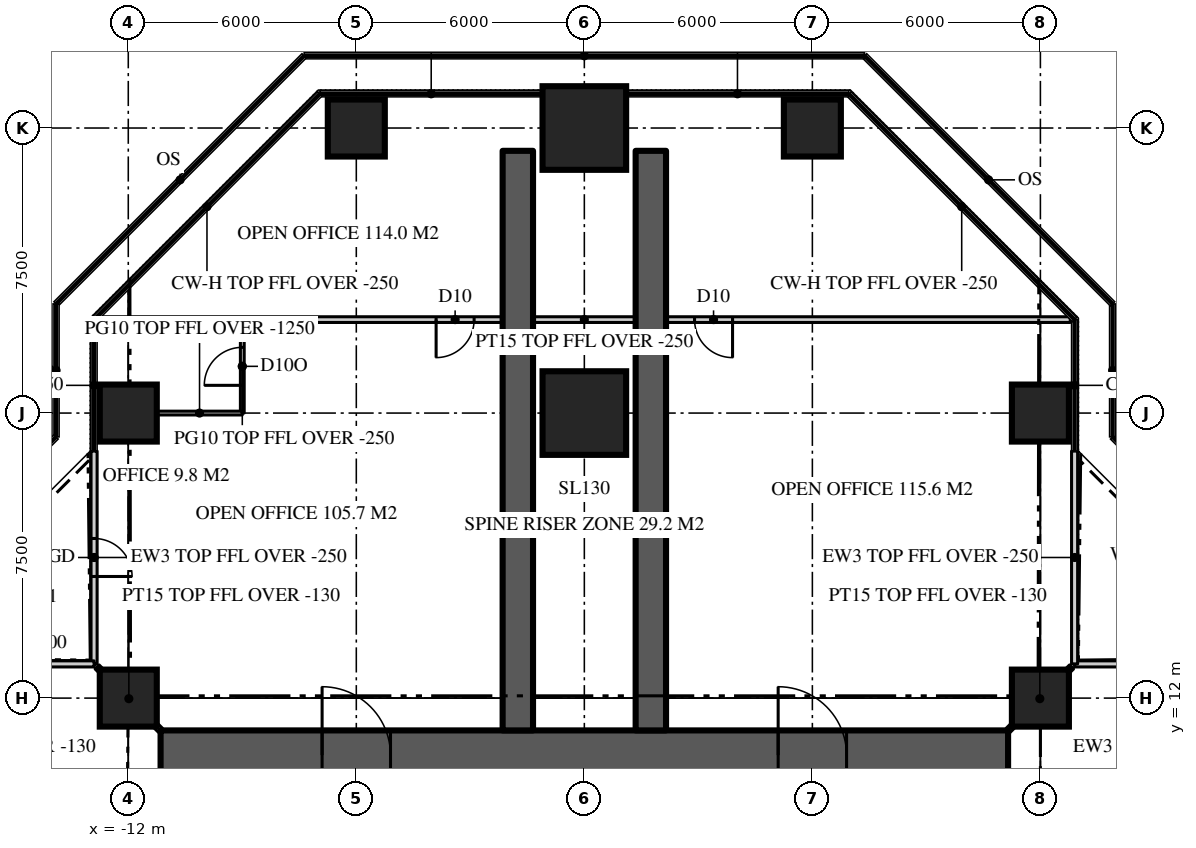
"""IFC4 building model, lengths in metres.
Left out: names, types, materials, properties, quantities, classifications, styles, units other than length and angle.
Written with IfcOpenShell. Run it as: python <this file> out.ifc"""

import sys

from ifc_helpers import new_model, si_unit, direction, frame, frame_2d, origin, origin_2d, place, context, subcontext, project, spatial, rectangle, extrude, element, fill, save


model = new_model("IFC4")
c1 = context("Model", 3, precision=1e-05, world=origin(), true_north=direction((0.0, 1.0)))
c2 = subcontext(c1, "Body", "Model", "MODEL_VIEW")
j1 = project(units=[si_unit("LENGTHUNIT", "METRE"), si_unit("PLANEANGLEUNIT", "RADIAN")], contexts=[c1])
p1 = place(None, origin())
s1 = spatial("IfcSite", under=j1, at=p1, CompositionType="ELEMENT")
p2 = place(p1, origin())
s2 = spatial("IfcBuilding", under=s1, at=p2, CompositionType="ELEMENT")
p3 = place(p2, frame((0.0, 0.0, 263.4)))
s3 = spatial("IfcBuildingStorey", under=s2, at=p3, CompositionType="ELEMENT", Elevation=263.4)
p4 = place(p3, frame((-11.15, 10.5, 0.0), z_axis=(0.0, 0.0, 1.0), x_axis=(1.0, 0.0, 0.0)))
e1 = element("IfcWall", 1, at=p4, inside=s3, PredefinedType="SHEAR", context=c2, shape_type="SweptSolid", body=[
    extrude(rectangle(XDim=22.3, YDim=1.3, at=frame_2d((11.15, 0.0))), origin(), (0.0, 0.0, 1.0), 3.9),
])
p5 = place(p4, frame((4.25, 0.0, 0.0)))
e2 = element("IfcOpeningElement", 2, at=p5, cuts=e1, PredefinedType="OPENING", context=c2, shape_type="SweptSolid", body=[
    extrude(rectangle(XDim=1.8, YDim=2.2, at=frame_2d((0.9, 1.1))), frame((0.0, 0.66, 0.0), z_axis=(0.0, -1.0, 0.0), x_axis=(1.0, 0.0, 0.0)), (0.0, 0.0, 1.0), 1.32),
])
p6 = place(p4, frame((16.25, 0.0, 0.0)))
e3 = element("IfcOpeningElement", 3, at=p6, cuts=e1, PredefinedType="OPENING", context=c2, shape_type="SweptSolid", body=[
    extrude(rectangle(XDim=1.8, YDim=2.2, at=frame_2d((0.9, 1.1))), frame((0.0, 0.66, 0.0), z_axis=(0.0, -1.0, 0.0), x_axis=(1.0, 0.0, 0.0)), (0.0, 0.0, 1.0), 1.32),
])
for number, where, z_axis, x_axis in (
    (4, (1.75, 11.15, 0.0), (0.0, 0.0, 1.0), (0.0, 1.0, 0.0)),
    (5, (-1.75, 11.15, 0.0), (0.0, 0.0, 1.0), (0.0, 1.0, 0.0)),
):
    element("IfcWall", number, at=place(p3, frame(where, z_axis=z_axis, x_axis=x_axis)), inside=s3, PredefinedType="SHEAR", context=c2, shape_type="SweptSolid", body=[
        extrude(rectangle(XDim=15.25, YDim=0.8, at=frame_2d((7.625, 0.0))), origin(), (0.0, 0.0, 1.0), 3.9),
    ])
for number, where, z_axis, x_axis in (
    (6, (-12.0, 12.0, 0.0), (0.0, 0.0, 1.0), (1.0, 0.0, 0.0)),
    (7, (12.0, 12.0, 0.0), (0.0, 0.0, 1.0), (1.0, 0.0, 0.0)),
    (8, (-12.0, 19.5, 0.0), (0.0, 0.0, 1.0), (1.0, 0.0, 0.0)),
):
    element("IfcColumn", number, at=place(p3, frame(where, z_axis=z_axis, x_axis=x_axis)), inside=s3, PredefinedType="COLUMN", context=c2, shape_type="SweptSolid", body=[
        extrude(rectangle(XDim=1.5, YDim=1.5, at=origin_2d()), origin(), (0.0, 0.0, 1.0), 3.9),
    ])
p7 = place(p3, frame((0.0, 19.5, 0.0), z_axis=(0.0, 0.0, 1.0), x_axis=(1.0, 0.0, 0.0)))
e9 = element("IfcColumn", 9, at=p7, inside=s3, PredefinedType="COLUMN", context=c2, shape_type="SweptSolid", body=[
    extrude(rectangle(XDim=2.2, YDim=2.2, at=origin_2d()), origin(), (0.0, 0.0, 1.0), 3.9),
])
for number, where, z_axis, x_axis in (
    (10, (12.0, 19.5, 0.0), (0.0, 0.0, 1.0), (1.0, 0.0, 0.0)),
    (11, (-6.0, 27.0, 0.0), (0.0, 0.0, 1.0), (1.0, 0.0, 0.0)),
):
    element("IfcColumn", number, at=place(p3, frame(where, z_axis=z_axis, x_axis=x_axis)), inside=s3, PredefinedType="COLUMN", context=c2, shape_type="SweptSolid", body=[
        extrude(rectangle(XDim=1.5, YDim=1.5, at=origin_2d()), origin(), (0.0, 0.0, 1.0), 3.9),
    ])
p8 = place(p3, frame((0.0, 27.0, 0.0), z_axis=(0.0, 0.0, 1.0), x_axis=(1.0, 0.0, 0.0)))
e12 = element("IfcColumn", 12, at=p8, inside=s3, PredefinedType="COLUMN", context=c2, shape_type="SweptSolid", body=[
    extrude(rectangle(XDim=2.2, YDim=2.2, at=origin_2d()), origin(), (0.0, 0.0, 1.0), 3.9),
])
p9 = place(p3, frame((6.0, 27.0, 0.0), z_axis=(0.0, 0.0, 1.0), x_axis=(1.0, 0.0, 0.0)))
e13 = element("IfcColumn", 13, at=p9, inside=s3, PredefinedType="COLUMN", context=c2, shape_type="SweptSolid", body=[
    extrude(rectangle(XDim=1.5, YDim=1.5, at=origin_2d()), origin(), (0.0, 0.0, 1.0), 3.9),
])
p10 = place(p3, frame((18.5, 12.9, 0.0), z_axis=(0.0, 0.0, 1.0), x_axis=(-1.0, 0.0, 0.0)))
e14 = element("IfcWall", 14, at=p10, inside=s3, PredefinedType="SOLIDWALL", context=c2, shape_type="SweptSolid", body=[
    extrude(rectangle(XDim=5.6, YDim=0.16, at=frame_2d((2.8, 0.0))), origin(), (0.0, 0.0, 1.0), 3.77),
])
p11 = place(p10, frame((2.3, 0.0, 0.0)))
e15 = element("IfcOpeningElement", 15, at=p11, cuts=e14, PredefinedType="OPENING", context=c2, shape_type="SweptSolid", body=[
    extrude(rectangle(XDim=1.0, YDim=2.2, at=frame_2d((0.5, 1.1))), frame((0.0, 0.09, 0.0), z_axis=(0.0, -1.0, 0.0), x_axis=(1.0, 0.0, 0.0)), (0.0, 0.0, 1.0), 0.18),
])
p12 = place(p3, frame((12.9, 12.9, 0.0), z_axis=(0.0, 0.0, 1.0), x_axis=(0.0, 1.0, 0.0)))
e16 = element("IfcWall", 16, at=p12, inside=s3, PredefinedType="SOLIDWALL", context=c2, shape_type="SweptSolid", body=[
    extrude(rectangle(XDim=5.6, YDim=0.16, at=frame_2d((2.8, 0.0))), origin(), (0.0, 0.0, 1.0), 3.65),
])
p13 = place(p3, frame((-12.9, 18.5, 0.0), z_axis=(0.0, 0.0, 1.0), x_axis=(0.0, -1.0, 0.0)))
e17 = element("IfcWall", 17, at=p13, inside=s3, PredefinedType="SOLIDWALL", context=c2, shape_type="SweptSolid", body=[
    extrude(rectangle(XDim=5.6, YDim=0.16, at=frame_2d((2.8, 0.0))), origin(), (0.0, 0.0, 1.0), 3.65),
])
p14 = place(p13, frame((2.3, 0.0, 0.0)))
e18 = element("IfcOpeningElement", 18, at=p14, cuts=e17, PredefinedType="OPENING", context=c2, shape_type="SweptSolid", body=[
    extrude(rectangle(XDim=1.0, YDim=2.2, at=frame_2d((0.5, 1.1))), frame((0.0, 0.09, 0.0), z_axis=(0.0, -1.0, 0.0), x_axis=(1.0, 0.0, 0.0)), (0.0, 0.0, 1.0), 0.18),
])
p15 = place(p3, frame((-12.9, 12.9, 0.0), z_axis=(0.0, 0.0, 1.0), x_axis=(-1.0, 0.0, 0.0)))
e19 = element("IfcWall", 19, at=p15, inside=s3, PredefinedType="SOLIDWALL", context=c2, shape_type="SweptSolid", body=[
    extrude(rectangle(XDim=5.6, YDim=0.16, at=frame_2d((2.8, 0.0))), origin(), (0.0, 0.0, 1.0), 3.77),
])
p16 = place(p3, frame((12.786, 21.959, 0.0), z_axis=(0.0, 0.0, 1.0), x_axis=(-1.0, 0.0, 0.0)))
e20 = element("IfcWall", 20, at=p16, inside=s3, PredefinedType="PARTITIONING", context=c2, shape_type="SweptSolid", body=[
    extrude(rectangle(XDim=25.573, YDim=0.15, at=frame_2d((12.786, 0.0))), origin(), (0.0, 0.0, 1.0), 3.65),
])
p17 = place(p16, frame((15.687, 0.0, 0.0)))
e21 = element("IfcOpeningElement", 21, at=p17, cuts=e20, PredefinedType="OPENING", context=c2, shape_type="SweptSolid", body=[
    extrude(rectangle(XDim=1.0, YDim=2.2, at=frame_2d((0.5, 1.1))), frame((0.0, 0.085, 0.0), z_axis=(0.0, -1.0, 0.0), x_axis=(1.0, 0.0, 0.0)), (0.0, 0.0, 1.0), 0.17),
])
p18 = place(p16, frame((8.886, 0.0, 0.0)))
e22 = element("IfcOpeningElement", 22, at=p18, cuts=e20, PredefinedType="OPENING", context=c2, shape_type="SweptSolid", body=[
    extrude(rectangle(XDim=1.0, YDim=2.2, at=frame_2d((0.5, 1.1))), frame((0.0, 0.085, 0.0), z_axis=(0.0, -1.0, 0.0), x_axis=(1.0, 0.0, 0.0)), (0.0, 0.0, 1.0), 0.17),
])
p19 = place(p3, frame((-9.0, 19.5, 0.0), z_axis=(0.0, 0.0, 1.0), x_axis=(0.0, 1.0, 0.0)))
e23 = element("IfcWall", 23, at=p19, inside=s3, PredefinedType="PARTITIONING", context=c2, shape_type="SweptSolid", body=[
    extrude(rectangle(XDim=2.459, YDim=0.1, at=frame_2d((1.229, 0.0))), origin(), (0.0, 0.0, 1.0), 3.65),
])
p20 = place(p19, frame((0.729, 0.0, 0.0)))
e24 = element("IfcOpeningElement", 24, at=p20, cuts=e23, PredefinedType="OPENING", context=c2, shape_type="SweptSolid", body=[
    extrude(rectangle(XDim=1.0, YDim=2.2, at=frame_2d((0.5, 1.1))), frame((0.0, 0.06, 0.0), z_axis=(0.0, -1.0, 0.0), x_axis=(1.0, 0.0, 0.0)), (0.0, 0.0, 1.0), 0.12),
])
p21 = place(p3, frame((-9.0, 19.5, 0.0), z_axis=(0.0, 0.0, 1.0), x_axis=(-1.0, 0.0, 0.0)))
e25 = element("IfcWall", 25, at=p21, inside=s3, PredefinedType="PARTITIONING", context=c2, shape_type="SweptSolid", body=[
    extrude(rectangle(XDim=2.25, YDim=0.1, at=frame_2d((1.125, 0.0))), origin(), (0.0, 0.0, 1.0), 2.65),
])
for number, where, z_axis, x_axis in (
    (26, (11.15, 11.15, 0.0), (0.0, 0.0, 1.0), (0.707, 0.707, 0.0)),
    (27, (-11.15, 11.15, 0.0), (0.0, 0.0, 1.0), (-0.707, 0.707, 0.0)),
):
    element("IfcWall", number, at=place(p3, frame(where, z_axis=z_axis, x_axis=x_axis)), inside=s3, PredefinedType="PARTITIONING", context=c2, shape_type="SweptSolid", body=[
        extrude(rectangle(XDim=2.362, YDim=0.15, at=frame_2d((1.181, 0.0))), origin(), (0.0, 0.0, 1.0), 3.77),
    ])
p22 = place(p14, origin())
e28 = element("IfcDoor", 28, at=p22, inside=s3, OperationType="SINGLE_SWING_RIGHT", PredefinedType="DOOR", context=c2, shape_type="SweptSolid", body=[
    extrude(rectangle(XDim=1.0, YDim=2.2, at=frame_2d((0.5, 1.1))), frame((0.0, 0.025, 0.0), z_axis=(0.0, -1.0, 0.0), x_axis=(1.0, 0.0, 0.0)), (0.0, 0.0, 1.0), 0.05),
])
fill(e18, e28)
p23 = place(p5, origin())
e29 = element("IfcDoor", 29, at=p23, inside=s3, OperationType="DOUBLE_DOOR_DOUBLE_SWING", PredefinedType="DOOR", context=c2, shape_type="SweptSolid", body=[
    extrude(rectangle(XDim=1.8, YDim=2.2, at=frame_2d((0.9, 1.1))), frame((0.0, 0.025, 0.0), z_axis=(0.0, -1.0, 0.0), x_axis=(1.0, 0.0, 0.0)), (0.0, 0.0, 1.0), 0.05),
])
fill(e2, e29)
p24 = place(p6, origin())
e30 = element("IfcDoor", 30, at=p24, inside=s3, OperationType="DOUBLE_DOOR_DOUBLE_SWING", PredefinedType="DOOR", context=c2, shape_type="SweptSolid", body=[
    extrude(rectangle(XDim=1.8, YDim=2.2, at=frame_2d((0.9, 1.1))), frame((0.0, 0.025, 0.0), z_axis=(0.0, -1.0, 0.0), x_axis=(1.0, 0.0, 0.0)), (0.0, 0.0, 1.0), 0.05),
])
fill(e3, e30)
p25 = place(p17, origin())
e31 = element("IfcDoor", 31, at=p25, inside=s3, OperationType="SINGLE_SWING_RIGHT", PredefinedType="DOOR", context=c2, shape_type="SweptSolid", body=[
    extrude(rectangle(XDim=1.0, YDim=2.2, at=frame_2d((0.5, 1.1))), frame((0.0, 0.025, 0.0), z_axis=(0.0, -1.0, 0.0), x_axis=(1.0, 0.0, 0.0)), (0.0, 0.0, 1.0), 0.05),
])
fill(e21, e31)
p26 = place(p18, origin())
e32 = element("IfcDoor", 32, at=p26, inside=s3, OperationType="SINGLE_SWING_LEFT", PredefinedType="DOOR", context=c2, shape_type="SweptSolid", body=[
    extrude(rectangle(XDim=1.0, YDim=2.2, at=frame_2d((0.5, 1.1))), frame((0.0, 0.025, 0.0), z_axis=(0.0, -1.0, 0.0), x_axis=(1.0, 0.0, 0.0)), (0.0, 0.0, 1.0), 0.05),
])
fill(e22, e32)
p27 = place(p20, origin())
e33 = element("IfcDoor", 33, at=p27, inside=s3, OperationType="SINGLE_SWING_LEFT", PredefinedType="DOOR", context=c2, shape_type="SweptSolid", body=[
    extrude(rectangle(XDim=1.0, YDim=2.2, at=frame_2d((0.5, 1.1))), frame((0.0, 0.025, 0.0), z_axis=(0.0, -1.0, 0.0), x_axis=(1.0, 0.0, 0.0)), (0.0, 0.0, 1.0), 0.05),
])
fill(e24, e33)
save(model, sys.argv[1])
